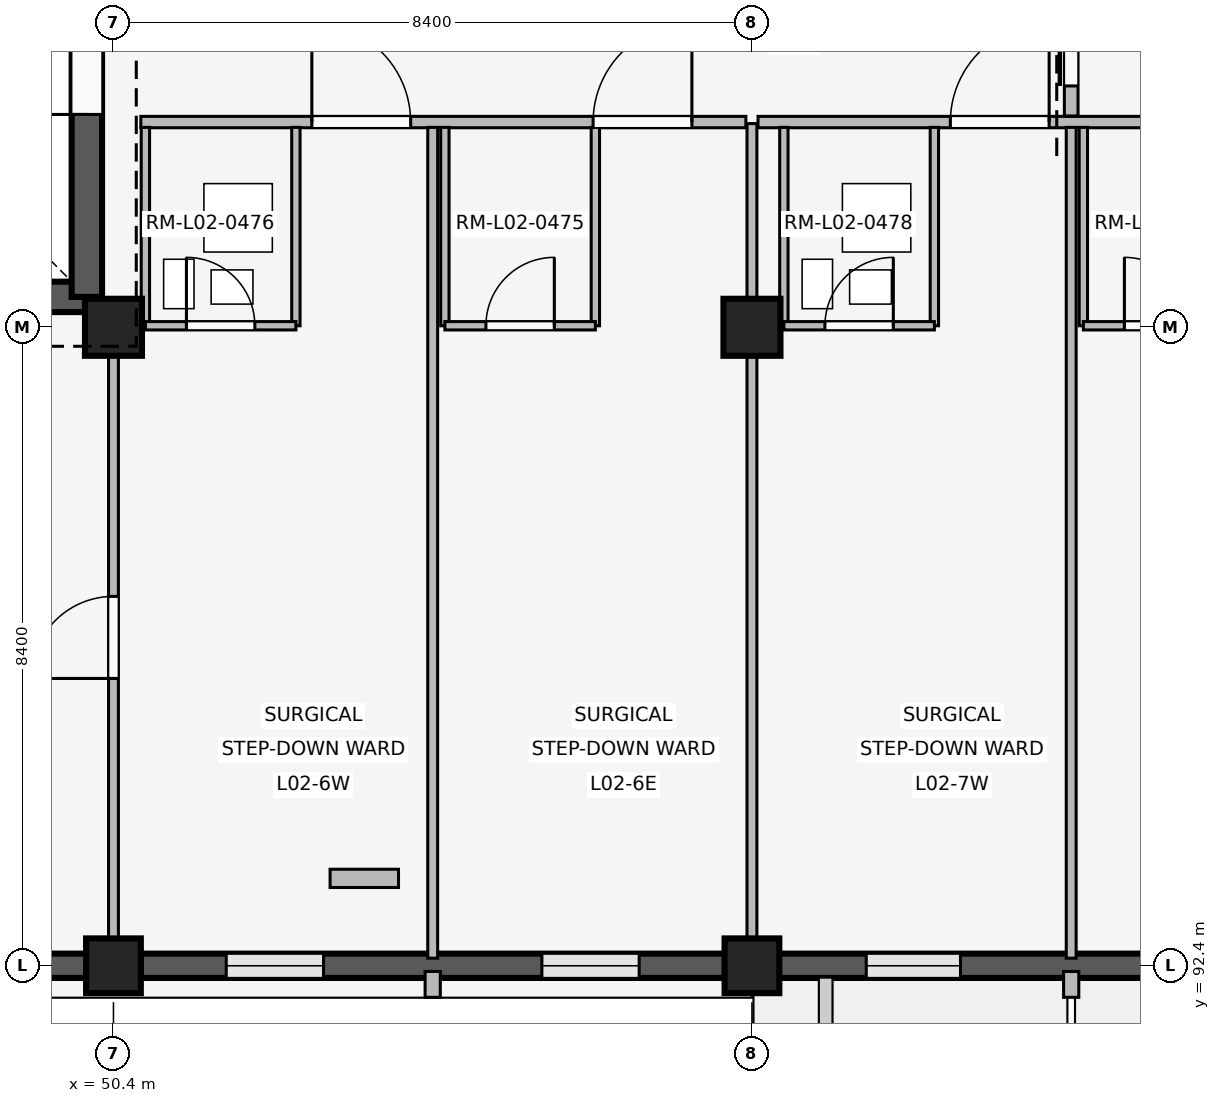
"""IFC4 building model, lengths in metres.
Left out: names, types, materials, properties, quantities, classifications, styles, units other than length and angle.
Written with IfcOpenShell. Run it as: python <this file> out.ifc"""

import sys

from ifc_helpers import new_model, si_unit, direction, frame, frame_2d, origin, origin_2d, place, context, subcontext, project, spatial, rectangle, extrude, element, fill, save


model = new_model("IFC4")
c1 = context("Model", 3, precision=1e-05, world=origin(), true_north=direction((0.0, 1.0)))
c2 = subcontext(c1, "Body", "Model", "MODEL_VIEW")
j1 = project(units=[si_unit("LENGTHUNIT", "METRE"), si_unit("PLANEANGLEUNIT", "RADIAN")], contexts=[c1])
p1 = place(None, origin())
s1 = spatial("IfcSite", under=j1, at=p1, CompositionType="ELEMENT")
p2 = place(p1, origin())
s2 = spatial("IfcBuilding", under=s1, at=p2, CompositionType="ELEMENT")
p3 = place(p2, frame((0.0, 0.0, 8.1)))
s3 = spatial("IfcBuildingStorey", under=s2, at=p3, CompositionType="ELEMENT", Elevation=8.1)
p4 = place(p3, frame((50.4, 92.4, 0.0), z_axis=(0.0, 0.0, 1.0), x_axis=(1.0, 0.0, 0.0)))
e1 = element("IfcColumn", 1, at=p4, inside=s3, PredefinedType="COLUMN", context=c2, shape_type="SweptSolid", body=[
    extrude(rectangle(XDim=0.72, YDim=0.72, at=origin_2d()), origin(), (0.0, 0.0, 1.0), 4.8),
])
p5 = place(p3, frame((50.4, 100.8, 0.0), z_axis=(0.0, 0.0, 1.0), x_axis=(1.0, 0.0, 0.0)))
e2 = element("IfcColumn", 2, at=p5, inside=s3, PredefinedType="COLUMN", context=c2, shape_type="SweptSolid", body=[
    extrude(rectangle(XDim=0.75, YDim=0.75, at=origin_2d()), origin(), (0.0, 0.0, 1.0), 4.8),
])
p6 = place(p3, frame((58.8, 92.4, 0.0), z_axis=(0.0, 0.0, 1.0), x_axis=(1.0, 0.0, 0.0)))
e3 = element("IfcColumn", 3, at=p6, inside=s3, PredefinedType="COLUMN", context=c2, shape_type="SweptSolid", body=[
    extrude(rectangle(XDim=0.72, YDim=0.72, at=origin_2d()), origin(), (0.0, 0.0, 1.0), 4.8),
])
p7 = place(p3, frame((58.8, 100.8, 0.0), z_axis=(0.0, 0.0, 1.0), x_axis=(1.0, 0.0, 0.0)))
e4 = element("IfcColumn", 4, at=p7, inside=s3, PredefinedType="COLUMN", context=c2, shape_type="SweptSolid", body=[
    extrude(rectangle(XDim=0.75, YDim=0.75, at=origin_2d()), origin(), (0.0, 0.0, 1.0), 4.8),
])
p8 = place(p3, frame((50.045, 92.4, 0.0), z_axis=(0.0, 0.0, 1.0), x_axis=(-1.0, 0.0, 0.0)))
e5 = element("IfcWall", 5, at=p8, inside=s3, PredefinedType="SOLIDWALL", context=c2, shape_type="SweptSolid", body=[
    extrude(rectangle(XDim=7.69, YDim=0.32, at=frame_2d((3.845, 0.0))), origin(), (0.0, 0.0, 1.0), 3.86),
])
p9 = place(p8, frame((1.089, 0.0, 0.85)))
e6 = element("IfcOpeningElement", 6, at=p9, cuts=e5, PredefinedType="OPENING", context=c2, shape_type="SweptSolid", body=[
    extrude(rectangle(XDim=1.36, YDim=1.42, at=frame_2d((0.68, 0.71))), frame((0.0, 0.17, 0.0), z_axis=(0.0, -1.0, 0.0), x_axis=(1.0, 0.0, 0.0)), (0.0, 0.0, 1.0), 0.34),
])
p10 = place(p8, frame((5.241, 0.0, 0.85)))
e7 = element("IfcOpeningElement", 7, at=p10, cuts=e5, PredefinedType="OPENING", context=c2, shape_type="SweptSolid", body=[
    extrude(rectangle(XDim=1.36, YDim=1.42, at=frame_2d((0.68, 0.71))), frame((0.0, 0.17, 0.0), z_axis=(0.0, -1.0, 0.0), x_axis=(1.0, 0.0, 0.0)), (0.0, 0.0, 1.0), 0.34),
])
p11 = place(p3, frame((58.445, 92.4, 0.0), z_axis=(0.0, 0.0, 1.0), x_axis=(-1.0, 0.0, 0.0)))
e8 = element("IfcWall", 8, at=p11, inside=s3, PredefinedType="SOLIDWALL", context=c2, shape_type="SweptSolid", body=[
    extrude(rectangle(XDim=7.69, YDim=0.32, at=frame_2d((3.845, 0.0))), origin(), (0.0, 0.0, 1.0), 3.86),
])
p12 = place(p11, frame((1.129, 0.0, 0.85)))
e9 = element("IfcOpeningElement", 9, at=p12, cuts=e8, PredefinedType="OPENING", context=c2, shape_type="SweptSolid", body=[
    extrude(rectangle(XDim=1.28, YDim=1.38, at=frame_2d((0.64, 0.69))), frame((0.0, 0.17, 0.0), z_axis=(0.0, -1.0, 0.0), x_axis=(1.0, 0.0, 0.0)), (0.0, 0.0, 1.0), 0.34),
])
p13 = place(p11, frame((5.281, 0.0, 0.85)))
e10 = element("IfcOpeningElement", 10, at=p13, cuts=e8, PredefinedType="OPENING", context=c2, shape_type="SweptSolid", body=[
    extrude(rectangle(XDim=1.28, YDim=1.38, at=frame_2d((0.64, 0.69))), frame((0.0, 0.17, 0.0), z_axis=(0.0, -1.0, 0.0), x_axis=(1.0, 0.0, 0.0)), (0.0, 0.0, 1.0), 0.34),
])
p14 = place(p3, frame((54.6, 92.325, 0.0), z_axis=(0.0, 0.0, 1.0), x_axis=(0.0, -1.0, 0.0)))
e11 = element("IfcWall", 11, at=p14, inside=s3, PredefinedType="ELEMENTEDWALL", context=c2, shape_type="SweptSolid", body=[
    extrude(rectangle(XDim=0.34, YDim=0.2, at=frame_2d((0.17, 0.0))), origin(), (0.0, 0.0, 1.0), 3.84),
])
p15 = place(p3, frame((66.845, 92.4, 0.0), z_axis=(0.0, 0.0, 1.0), x_axis=(-1.0, 0.0, 0.0)))
e12 = element("IfcWall", 12, at=p15, inside=s3, PredefinedType="SOLIDWALL", context=c2, shape_type="SweptSolid", body=[
    extrude(rectangle(XDim=7.69, YDim=0.32, at=frame_2d((3.845, 0.0))), origin(), (0.0, 0.0, 1.0), 3.86),
])
p16 = place(p15, frame((1.149, 0.0, 0.85)))
e13 = element("IfcOpeningElement", 13, at=p16, cuts=e12, PredefinedType="OPENING", context=c2, shape_type="SweptSolid", body=[
    extrude(rectangle(XDim=1.24, YDim=1.34, at=frame_2d((0.62, 0.67))), frame((0.0, 0.17, 0.0), z_axis=(0.0, -1.0, 0.0), x_axis=(1.0, 0.0, 0.0)), (0.0, 0.0, 1.0), 0.34),
])
p17 = place(p15, frame((5.301, 0.0, 0.85)))
e14 = element("IfcOpeningElement", 14, at=p17, cuts=e12, PredefinedType="OPENING", context=c2, shape_type="SweptSolid", body=[
    extrude(rectangle(XDim=1.24, YDim=1.34, at=frame_2d((0.62, 0.67))), frame((0.0, 0.17, 0.0), z_axis=(0.0, -1.0, 0.0), x_axis=(1.0, 0.0, 0.0)), (0.0, 0.0, 1.0), 0.34),
])
p18 = place(p3, frame((63.0, 92.325, 0.0), z_axis=(0.0, 0.0, 1.0), x_axis=(0.0, -1.0, 0.0)))
e15 = element("IfcWall", 15, at=p18, inside=s3, PredefinedType="ELEMENTEDWALL", context=c2, shape_type="SweptSolid", body=[
    extrude(rectangle(XDim=0.34, YDim=0.2, at=frame_2d((0.17, 0.0))), origin(), (0.0, 0.0, 1.0), 3.84),
])
p19 = place(p3, frame((42.55, 101.2, 0.0), z_axis=(0.0, 0.0, 1.0), x_axis=(1.0, 0.0, 0.0)))
e16 = element("IfcWall", 16, at=p19, inside=s3, PredefinedType="SHEAR", context=c2, shape_type="SweptSolid", body=[
    extrude(rectangle(XDim=7.5, YDim=0.4, at=frame_2d((3.75, 0.0))), origin(), (0.0, 0.0, 1.0), 4.52),
])
p20 = place(p19, frame((4.85, 0.0, 0.0)))
e17 = element("IfcOpeningElement", 17, at=p20, cuts=e16, PredefinedType="OPENING", context=c2, shape_type="SweptSolid", body=[
    extrude(rectangle(XDim=1.2, YDim=2.2, at=frame_2d((0.6, 1.1))), frame((0.0, 0.21, 0.0), z_axis=(0.0, -1.0, 0.0), x_axis=(1.0, 0.0, 0.0)), (0.0, 0.0, 1.0), 0.42),
])
p21 = place(p3, frame((50.05, 101.2, 0.0), z_axis=(0.0, 0.0, 1.0), x_axis=(0.0, 1.0, 0.0)))
e18 = element("IfcWall", 18, at=p21, inside=s3, PredefinedType="SHEAR", context=c2, shape_type="SweptSolid", body=[
    extrude(rectangle(XDim=7.55, YDim=0.4, at=frame_2d((3.775, 0.0))), origin(), (0.0, 0.0, 1.0), 4.52),
])
p22 = place(p21, frame((2.4, 0.0, 0.0)))
e19 = element("IfcOpeningElement", 19, at=p22, cuts=e18, PredefinedType="OPENING", context=c2, shape_type="SweptSolid", body=[
    extrude(rectangle(XDim=1.2, YDim=2.2, at=frame_2d((0.6, 1.1))), frame((0.0, 0.21, 0.0), z_axis=(0.0, -1.0, 0.0), x_axis=(1.0, 0.0, 0.0)), (0.0, 0.0, 1.0), 0.42),
])
p23 = place(p3, frame((50.4, 92.54, 0.0), z_axis=(0.0, 0.0, 1.0), x_axis=(0.0, 1.0, 0.0)))
e20 = element("IfcWall", 20, at=p23, inside=s3, PredefinedType="PARTITIONING", context=c2, shape_type="SweptSolid", body=[
    extrude(rectangle(XDim=8.21, YDim=0.13, at=frame_2d((4.105, 0.0))), origin(), (0.0, 0.0, 1.0), 3.84),
])
p24 = place(p23, frame((3.64, 0.0, 0.0)))
e21 = element("IfcOpeningElement", 21, at=p24, cuts=e20, PredefinedType="OPENING", context=c2, shape_type="SweptSolid", body=[
    extrude(rectangle(XDim=1.08, YDim=2.15, at=frame_2d((0.54, 1.075))), frame((0.0, 0.075, 0.0), z_axis=(0.0, -1.0, 0.0), x_axis=(1.0, 0.0, 0.0)), (0.0, 0.0, 1.0), 0.15),
])
p25 = place(p3, frame((50.76, 103.5, 0.0), z_axis=(0.0, 0.0, 1.0), x_axis=(1.0, 0.0, 0.0)))
e22 = element("IfcWall", 22, at=p25, inside=s3, PredefinedType="PARTITIONING", context=c2, shape_type="SweptSolid", body=[
    extrude(rectangle(XDim=7.96, YDim=0.15, at=frame_2d((3.98, 0.0))), origin(), (0.0, 0.0, 1.0), 3.84),
])
p26 = place(p25, frame((2.25, 0.0, 0.0)))
e23 = element("IfcOpeningElement", 23, at=p26, cuts=e22, PredefinedType="OPENING", context=c2, shape_type="SweptSolid", body=[
    extrude(rectangle(XDim=1.3, YDim=2.25, at=frame_2d((0.65, 1.125))), frame((0.0, 0.085, 0.0), z_axis=(0.0, -1.0, 0.0), x_axis=(1.0, 0.0, 0.0)), (0.0, 0.0, 1.0), 0.17),
])
p27 = place(p25, frame((5.95, 0.0, 0.0)))
e24 = element("IfcOpeningElement", 24, at=p27, cuts=e22, PredefinedType="OPENING", context=c2, shape_type="SweptSolid", body=[
    extrude(rectangle(XDim=1.3, YDim=2.25, at=frame_2d((0.65, 1.125))), frame((0.0, 0.085, 0.0), z_axis=(0.0, -1.0, 0.0), x_axis=(1.0, 0.0, 0.0)), (0.0, 0.0, 1.0), 0.17),
])
p28 = place(p3, frame((54.6, 92.5, 0.0), z_axis=(0.0, 0.0, 1.0), x_axis=(0.0, 1.0, 0.0)))
e25 = element("IfcWall", 25, at=p28, inside=s3, PredefinedType="PARTITIONING", context=c2, shape_type="SweptSolid", body=[
    extrude(rectangle(XDim=10.93, YDim=0.13, at=frame_2d((5.465, 0.0))), origin(), (0.0, 0.0, 1.0), 3.84),
])
for number, where, z_axis, x_axis in (
    (26, (50.82, 100.82, 0.0), (0.0, 0.0, 1.0), (0.0, 1.0, 0.0)),
    (27, (52.8, 100.82, 0.0), (0.0, 0.0, 1.0), (0.0, 1.0, 0.0)),
):
    element("IfcWall", number, at=place(p3, frame(where, z_axis=z_axis, x_axis=x_axis)), inside=s3, PredefinedType="PARTITIONING", context=c2, shape_type="SweptSolid", body=[
        extrude(rectangle(XDim=2.61, YDim=0.11, at=frame_2d((1.305, 0.0))), origin(), (0.0, 0.0, 1.0), 3.84),
    ])
p29 = place(p3, frame((50.82, 100.82, 0.0), z_axis=(0.0, 0.0, 1.0), x_axis=(1.0, 0.0, 0.0)))
e28 = element("IfcWall", 28, at=p29, inside=s3, PredefinedType="PARTITIONING", context=c2, shape_type="SweptSolid", body=[
    extrude(rectangle(XDim=1.98, YDim=0.11, at=frame_2d((0.99, 0.0))), origin(), (0.0, 0.0, 1.0), 3.84),
])
p30 = place(p29, frame((0.54, 0.0, 0.0)))
e29 = element("IfcOpeningElement", 29, at=p30, cuts=e28, PredefinedType="OPENING", context=c2, shape_type="SweptSolid", body=[
    extrude(rectangle(XDim=0.9, YDim=2.1, at=frame_2d((0.45, 1.05))), frame((0.0, 0.065, 0.0), z_axis=(0.0, -1.0, 0.0), x_axis=(1.0, 0.0, 0.0)), (0.0, 0.0, 1.0), 0.13),
])
for number, where, z_axis, x_axis in (
    (30, (54.76, 100.82, 0.0), (0.0, 0.0, 1.0), (0.0, 1.0, 0.0)),
    (31, (56.74, 100.82, 0.0), (0.0, 0.0, 1.0), (0.0, 1.0, 0.0)),
):
    element("IfcWall", number, at=place(p3, frame(where, z_axis=z_axis, x_axis=x_axis)), inside=s3, PredefinedType="PARTITIONING", context=c2, shape_type="SweptSolid", body=[
        extrude(rectangle(XDim=2.61, YDim=0.11, at=frame_2d((1.305, 0.0))), origin(), (0.0, 0.0, 1.0), 3.84),
    ])
p31 = place(p3, frame((54.76, 100.82, 0.0), z_axis=(0.0, 0.0, 1.0), x_axis=(1.0, 0.0, 0.0)))
e32 = element("IfcWall", 32, at=p31, inside=s3, PredefinedType="PARTITIONING", context=c2, shape_type="SweptSolid", body=[
    extrude(rectangle(XDim=1.98, YDim=0.11, at=frame_2d((0.99, 0.0))), origin(), (0.0, 0.0, 1.0), 3.84),
])
p32 = place(p31, frame((0.54, 0.0, 0.0)))
e33 = element("IfcOpeningElement", 33, at=p32, cuts=e32, PredefinedType="OPENING", context=c2, shape_type="SweptSolid", body=[
    extrude(rectangle(XDim=0.9, YDim=2.1, at=frame_2d((0.45, 1.05))), frame((0.0, 0.065, 0.0), z_axis=(0.0, -1.0, 0.0), x_axis=(1.0, 0.0, 0.0)), (0.0, 0.0, 1.0), 0.13),
])
p33 = place(p3, frame((53.25, 93.55, 0.0), z_axis=(0.0, 0.0, 1.0), x_axis=(1.0, 0.0, 0.0)))
e34 = element("IfcWall", 34, at=p33, inside=s3, PredefinedType="PLUMBINGWALL", context=c2, shape_type="SweptSolid", body=[
    extrude(rectangle(XDim=0.9, YDim=0.24, at=frame_2d((0.45, 0.0))), origin(), (0.0, 0.0, 1.0), 3.84),
])
p34 = place(p3, frame((58.8, 92.54, 0.0), z_axis=(0.0, 0.0, 1.0), x_axis=(0.0, 1.0, 0.0)))
e35 = element("IfcWall", 35, at=p34, inside=s3, PredefinedType="PARTITIONING", context=c2, shape_type="SweptSolid", body=[
    extrude(rectangle(XDim=10.94, YDim=0.13, at=frame_2d((5.47, 0.0))), origin(), (0.0, 0.0, 1.0), 3.84),
])
p35 = place(p3, frame((58.88, 103.5, 0.0), z_axis=(0.0, 0.0, 1.0), x_axis=(1.0, 0.0, 0.0)))
e36 = element("IfcWall", 36, at=p35, inside=s3, PredefinedType="PARTITIONING", context=c2, shape_type="SweptSolid", body=[
    extrude(rectangle(XDim=8.24, YDim=0.15, at=frame_2d((4.12, 0.0))), origin(), (0.0, 0.0, 1.0), 3.84),
])
p36 = place(p35, frame((2.53, 0.0, 0.0)))
e37 = element("IfcOpeningElement", 37, at=p36, cuts=e36, PredefinedType="OPENING", context=c2, shape_type="SweptSolid", body=[
    extrude(rectangle(XDim=1.3, YDim=2.25, at=frame_2d((0.65, 1.125))), frame((0.0, 0.085, 0.0), z_axis=(0.0, -1.0, 0.0), x_axis=(1.0, 0.0, 0.0)), (0.0, 0.0, 1.0), 0.17),
])
p37 = place(p35, frame((6.23, 0.0, 0.0)))
e38 = element("IfcOpeningElement", 38, at=p37, cuts=e36, PredefinedType="OPENING", context=c2, shape_type="SweptSolid", body=[
    extrude(rectangle(XDim=1.3, YDim=2.25, at=frame_2d((0.65, 1.125))), frame((0.0, 0.085, 0.0), z_axis=(0.0, -1.0, 0.0), x_axis=(1.0, 0.0, 0.0)), (0.0, 0.0, 1.0), 0.17),
])
p38 = place(p3, frame((63.0, 92.5, 0.0), z_axis=(0.0, 0.0, 1.0), x_axis=(0.0, 1.0, 0.0)))
e39 = element("IfcWall", 39, at=p38, inside=s3, PredefinedType="PARTITIONING", context=c2, shape_type="SweptSolid", body=[
    extrude(rectangle(XDim=10.93, YDim=0.13, at=frame_2d((5.465, 0.0))), origin(), (0.0, 0.0, 1.0), 3.84),
])
for number, where, z_axis, x_axis in (
    (40, (59.22, 100.82, 0.0), (0.0, 0.0, 1.0), (0.0, 1.0, 0.0)),
    (41, (61.2, 100.82, 0.0), (0.0, 0.0, 1.0), (0.0, 1.0, 0.0)),
):
    element("IfcWall", number, at=place(p3, frame(where, z_axis=z_axis, x_axis=x_axis)), inside=s3, PredefinedType="PARTITIONING", context=c2, shape_type="SweptSolid", body=[
        extrude(rectangle(XDim=2.61, YDim=0.11, at=frame_2d((1.305, 0.0))), origin(), (0.0, 0.0, 1.0), 3.84),
    ])
p39 = place(p3, frame((59.22, 100.82, 0.0), z_axis=(0.0, 0.0, 1.0), x_axis=(1.0, 0.0, 0.0)))
e42 = element("IfcWall", 42, at=p39, inside=s3, PredefinedType="PARTITIONING", context=c2, shape_type="SweptSolid", body=[
    extrude(rectangle(XDim=1.98, YDim=0.11, at=frame_2d((0.99, 0.0))), origin(), (0.0, 0.0, 1.0), 3.84),
])
p40 = place(p39, frame((0.54, 0.0, 0.0)))
e43 = element("IfcOpeningElement", 43, at=p40, cuts=e42, PredefinedType="OPENING", context=c2, shape_type="SweptSolid", body=[
    extrude(rectangle(XDim=0.9, YDim=2.1, at=frame_2d((0.45, 1.05))), frame((0.0, 0.065, 0.0), z_axis=(0.0, -1.0, 0.0), x_axis=(1.0, 0.0, 0.0)), (0.0, 0.0, 1.0), 0.13),
])
p41 = place(p3, frame((63.16, 100.82, 0.0), z_axis=(0.0, 0.0, 1.0), x_axis=(0.0, 1.0, 0.0)))
e44 = element("IfcWall", 44, at=p41, inside=s3, PredefinedType="PARTITIONING", context=c2, shape_type="SweptSolid", body=[
    extrude(rectangle(XDim=2.61, YDim=0.11, at=frame_2d((1.305, 0.0))), origin(), (0.0, 0.0, 1.0), 3.84),
])
p42 = place(p3, frame((63.16, 100.82, 0.0), z_axis=(0.0, 0.0, 1.0), x_axis=(1.0, 0.0, 0.0)))
e45 = element("IfcWall", 45, at=p42, inside=s3, PredefinedType="PARTITIONING", context=c2, shape_type="SweptSolid", body=[
    extrude(rectangle(XDim=1.98, YDim=0.11, at=frame_2d((0.99, 0.0))), origin(), (0.0, 0.0, 1.0), 3.84),
])
p43 = place(p42, frame((0.54, 0.0, 0.0)))
e46 = element("IfcOpeningElement", 46, at=p43, cuts=e45, PredefinedType="OPENING", context=c2, shape_type="SweptSolid", body=[
    extrude(rectangle(XDim=0.9, YDim=2.1, at=frame_2d((0.45, 1.05))), frame((0.0, 0.065, 0.0), z_axis=(0.0, -1.0, 0.0), x_axis=(1.0, 0.0, 0.0)), (0.0, 0.0, 1.0), 0.13),
])
p44 = place(p3, frame((63.0, 103.58, 0.0), z_axis=(0.0, 0.0, 1.0), x_axis=(0.0, 1.0, 0.0)))
e47 = element("IfcWall", 47, at=p44, inside=s3, PredefinedType="PARTITIONING", context=c2, shape_type="SweptSolid", body=[
    extrude(rectangle(XDim=2.84, YDim=0.18, at=frame_2d((1.42, 0.0))), origin(), (0.0, 0.0, 1.0), 3.84),
])
p45 = place(p44, frame((0.395, 0.0, 0.0)))
e48 = element("IfcOpeningElement", 48, at=p45, cuts=e47, PredefinedType="OPENING", context=c2, shape_type="SweptSolid", body=[
    extrude(rectangle(XDim=2.05, YDim=2.35, at=frame_2d((1.025, 1.175))), frame((0.0, 0.1, 0.0), z_axis=(0.0, -1.0, 0.0), x_axis=(1.0, 0.0, 0.0)), (0.0, 0.0, 1.0), 0.2),
])
p46 = place(p12, origin())
e49 = element("IfcWindow", 49, at=p46, inside=s3, PartitioningType="SINGLE_PANEL", PredefinedType="WINDOW", context=c2, shape_type="SweptSolid", body=[
    extrude(rectangle(XDim=1.28, YDim=1.38, at=frame_2d((0.64, 0.69))), frame((0.0, 0.03, 0.0), z_axis=(0.0, -1.0, 0.0), x_axis=(1.0, 0.0, 0.0)), (0.0, 0.0, 1.0), 0.06),
])
fill(e9, e49)
p47 = place(p13, origin())
e50 = element("IfcWindow", 50, at=p47, inside=s3, PartitioningType="SINGLE_PANEL", PredefinedType="WINDOW", context=c2, shape_type="SweptSolid", body=[
    extrude(rectangle(XDim=1.28, YDim=1.38, at=frame_2d((0.64, 0.69))), frame((0.0, 0.03, 0.0), z_axis=(0.0, -1.0, 0.0), x_axis=(1.0, 0.0, 0.0)), (0.0, 0.0, 1.0), 0.06),
])
fill(e10, e50)
p48 = place(p17, origin())
e51 = element("IfcWindow", 51, at=p48, inside=s3, PartitioningType="SINGLE_PANEL", PredefinedType="WINDOW", context=c2, shape_type="SweptSolid", body=[
    extrude(rectangle(XDim=1.24, YDim=1.34, at=frame_2d((0.62, 0.67))), frame((0.0, 0.03, 0.0), z_axis=(0.0, -1.0, 0.0), x_axis=(1.0, 0.0, 0.0)), (0.0, 0.0, 1.0), 0.06),
])
fill(e14, e51)
p49 = place(p22, origin())
e52 = element("IfcDoor", 52, at=p49, inside=s3, OperationType="SINGLE_SWING_LEFT", PredefinedType="DOOR", context=c2, shape_type="SweptSolid", body=[
    extrude(rectangle(XDim=1.2, YDim=2.2, at=frame_2d((0.6, 1.1))), frame((0.0, 0.025, 0.0), z_axis=(0.0, -1.0, 0.0), x_axis=(1.0, 0.0, 0.0)), (0.0, 0.0, 1.0), 0.05),
])
fill(e19, e52)
p50 = place(p24, origin())
e53 = element("IfcDoor", 53, at=p50, inside=s3, OperationType="SINGLE_SWING_LEFT", PredefinedType="DOOR", context=c2, shape_type="SweptSolid", body=[
    extrude(rectangle(XDim=1.08, YDim=2.15, at=frame_2d((0.54, 1.075))), frame((0.0, 0.025, 0.0), z_axis=(0.0, -1.0, 0.0), x_axis=(1.0, 0.0, 0.0)), (0.0, 0.0, 1.0), 0.05),
])
fill(e21, e53)
p51 = place(p26, origin())
e54 = element("IfcDoor", 54, at=p51, inside=s3, OperationType="SINGLE_SWING_LEFT", PredefinedType="DOOR", context=c2, shape_type="SweptSolid", body=[
    extrude(rectangle(XDim=1.3, YDim=2.25, at=frame_2d((0.65, 1.125))), frame((0.0, 0.025, 0.0), z_axis=(0.0, -1.0, 0.0), x_axis=(1.0, 0.0, 0.0)), (0.0, 0.0, 1.0), 0.05),
])
fill(e23, e54)
p52 = place(p27, origin())
e55 = element("IfcDoor", 55, at=p52, inside=s3, OperationType="SINGLE_SWING_RIGHT", PredefinedType="DOOR", context=c2, shape_type="SweptSolid", body=[
    extrude(rectangle(XDim=1.3, YDim=2.25, at=frame_2d((0.65, 1.125))), frame((0.0, 0.025, 0.0), z_axis=(0.0, -1.0, 0.0), x_axis=(1.0, 0.0, 0.0)), (0.0, 0.0, 1.0), 0.05),
])
fill(e24, e55)
p53 = place(p30, origin())
e56 = element("IfcDoor", 56, at=p53, inside=s3, OperationType="SINGLE_SWING_LEFT", PredefinedType="DOOR", context=c2, shape_type="SweptSolid", body=[
    extrude(rectangle(XDim=0.9, YDim=2.1, at=frame_2d((0.45, 1.05))), frame((0.0, 0.025, 0.0), z_axis=(0.0, -1.0, 0.0), x_axis=(1.0, 0.0, 0.0)), (0.0, 0.0, 1.0), 0.05),
])
fill(e29, e56)
p54 = place(p32, origin())
e57 = element("IfcDoor", 57, at=p54, inside=s3, OperationType="SINGLE_SWING_RIGHT", PredefinedType="DOOR", context=c2, shape_type="SweptSolid", body=[
    extrude(rectangle(XDim=0.9, YDim=2.1, at=frame_2d((0.45, 1.05))), frame((0.0, 0.025, 0.0), z_axis=(0.0, -1.0, 0.0), x_axis=(1.0, 0.0, 0.0)), (0.0, 0.0, 1.0), 0.05),
])
fill(e33, e57)
p55 = place(p36, origin())
e58 = element("IfcDoor", 58, at=p55, inside=s3, OperationType="SINGLE_SWING_RIGHT", PredefinedType="DOOR", context=c2, shape_type="SweptSolid", body=[
    extrude(rectangle(XDim=1.3, YDim=2.25, at=frame_2d((0.65, 1.125))), frame((0.0, 0.025, 0.0), z_axis=(0.0, -1.0, 0.0), x_axis=(1.0, 0.0, 0.0)), (0.0, 0.0, 1.0), 0.05),
])
fill(e37, e58)
p56 = place(p40, origin())
e59 = element("IfcDoor", 59, at=p56, inside=s3, OperationType="SINGLE_SWING_RIGHT", PredefinedType="DOOR", context=c2, shape_type="SweptSolid", body=[
    extrude(rectangle(XDim=0.9, YDim=2.1, at=frame_2d((0.45, 1.05))), frame((0.0, 0.025, 0.0), z_axis=(0.0, -1.0, 0.0), x_axis=(1.0, 0.0, 0.0)), (0.0, 0.0, 1.0), 0.05),
])
fill(e43, e59)
p57 = place(p43, origin())
e60 = element("IfcDoor", 60, at=p57, inside=s3, OperationType="SINGLE_SWING_LEFT", PredefinedType="DOOR", context=c2, shape_type="SweptSolid", body=[
    extrude(rectangle(XDim=0.9, YDim=2.1, at=frame_2d((0.45, 1.05))), frame((0.0, 0.025, 0.0), z_axis=(0.0, -1.0, 0.0), x_axis=(1.0, 0.0, 0.0)), (0.0, 0.0, 1.0), 0.05),
])
fill(e46, e60)
p58 = place(p45, origin())
e61 = element("IfcDoor", 61, at=p58, inside=s3, OperationType="SLIDING_TO_LEFT", PredefinedType="DOOR", context=c2, shape_type="SweptSolid", body=[
    extrude(rectangle(XDim=2.05, YDim=2.35, at=frame_2d((1.025, 1.175))), frame((0.0, 0.025, 0.0), z_axis=(0.0, -1.0, 0.0), x_axis=(1.0, 0.0, 0.0)), (0.0, 0.0, 1.0), 0.05),
])
fill(e48, e61)
save(model, sys.argv[1])
